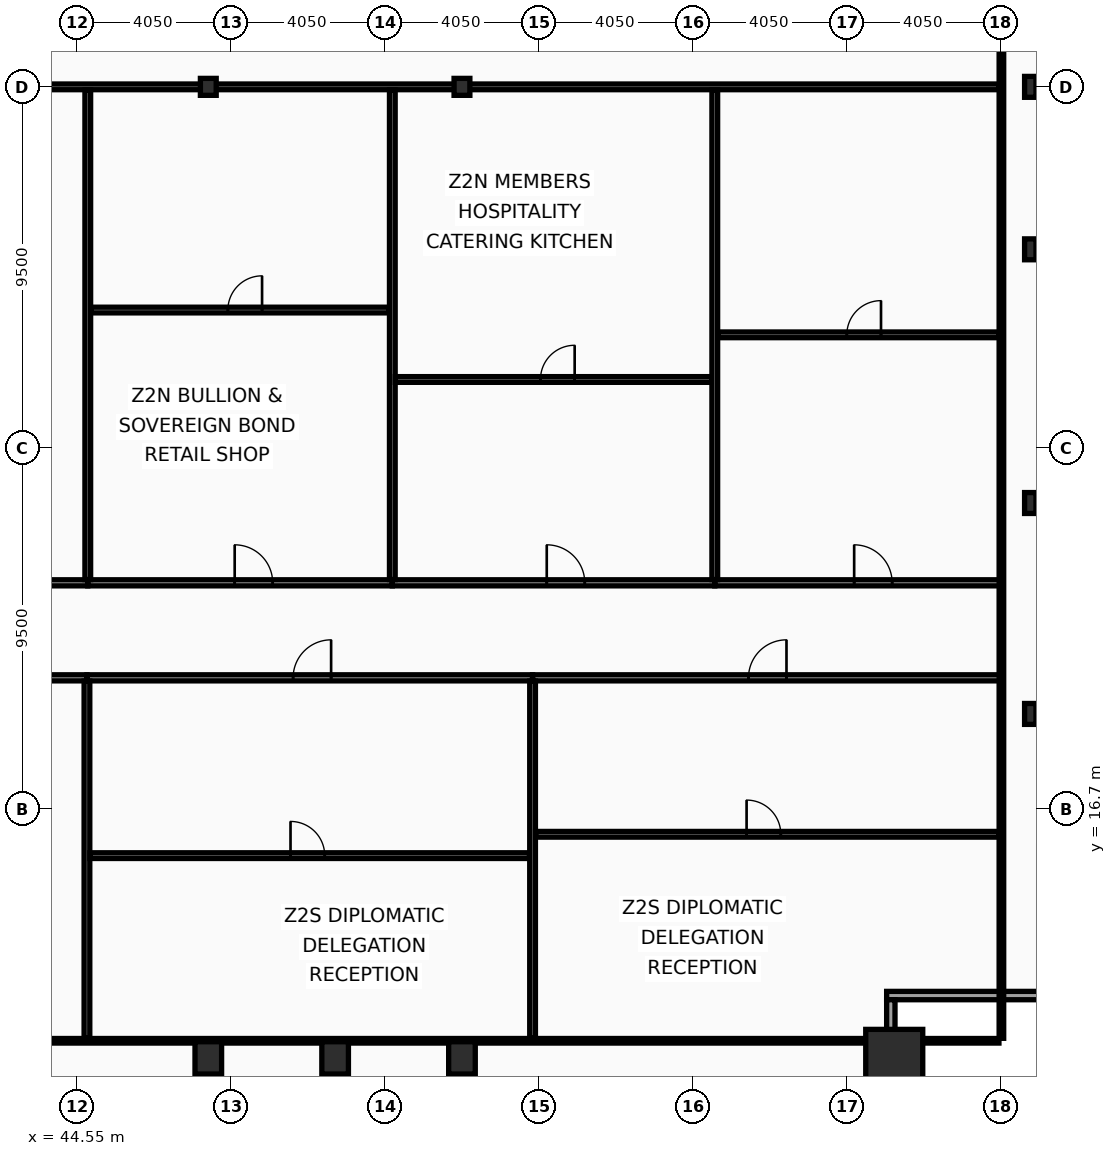
"""IFC4 building model, lengths in metres.
Left out: names, types, materials, properties, quantities, classifications, styles, units other than length and angle.
Written with IfcOpenShell. Run it as: python <this file> out.ifc"""

import sys

from ifc_helpers import new_model, si_unit, direction, frame, frame_2d, origin, origin_2d, place, context, subcontext, project, spatial, rectangle, hollow_rectangle, i_section, extrude, element, fill, save


model = new_model("IFC4")
c1 = context("Model", 3, precision=1e-05, world=origin(), true_north=direction((0.0, 1.0)))
c2 = subcontext(c1, "Body", "Model", "MODEL_VIEW")
j1 = project(units=[si_unit("LENGTHUNIT", "METRE"), si_unit("PLANEANGLEUNIT", "RADIAN")], contexts=[c1])
p1 = place(None, origin())
s1 = spatial("IfcSite", under=j1, at=p1, CompositionType="ELEMENT")
p2 = place(p1, origin())
s2 = spatial("IfcBuilding", under=s1, at=p2, CompositionType="ELEMENT")
p3 = place(p2, frame((0.0, 0.0, 118.2)))
s3 = spatial("IfcBuildingStorey", under=s2, at=p3, CompositionType="ELEMENT", Elevation=118.2)
p4 = place(p3, frame((66.05, 10.15, 0.0), z_axis=(0.0, 0.0, 1.0), x_axis=(1.0, 0.0, 0.0)))
e1 = element("IfcColumn", 1, at=p4, inside=s3, PredefinedType="COLUMN", context=c2, shape_type="SweptSolid", body=[
    extrude(hollow_rectangle(XDim=1.5, YDim=1.5, WallThickness=0.07, at=origin_2d()), origin(), (0.0, 0.0, 1.0), 3.6),
])
for number, where, z_axis, x_axis in (
    (2, (48.0, 10.15, 0.0), (0.0, 0.0, 1.0), (1.0, 0.0, 0.0)),
    (3, (51.337, 10.15, 0.0), (0.0, 0.0, 1.0), (1.0, 0.0, 0.0)),
    (4, (54.675, 10.15, 0.0), (0.0, 0.0, 1.0), (1.0, 0.0, 0.0)),
):
    element("IfcColumn", number, at=place(p3, frame(where, z_axis=z_axis, x_axis=x_axis)), inside=s3, PredefinedType="COLUMN", context=c2, shape_type="SweptSolid", body=[
        extrude(hollow_rectangle(XDim=0.7, YDim=0.85, WallThickness=0.05, at=origin_2d()), origin(), (0.0, 0.0, 1.0), 3.6),
    ])
for number, where, z_axis, x_axis in (
    (5, (69.63, 19.2, 0.0), (0.0, 0.0, 1.0), (1.0, 0.0, 0.0)),
    (6, (69.63, 24.75, 0.0), (0.0, 0.0, 1.0), (1.0, 0.0, 0.0)),
    (7, (69.63, 31.425, 0.0), (0.0, 0.0, 1.0), (1.0, 0.0, 0.0)),
    (8, (69.63, 35.7, 0.0), (0.0, 0.0, 1.0), (1.0, 0.0, 0.0)),
):
    element("IfcColumn", number, at=place(p3, frame(where, z_axis=z_axis, x_axis=x_axis)), inside=s3, PredefinedType="COLUMN", context=c2, shape_type="SweptSolid", body=[
        extrude(i_section(OverallWidth=0.3, OverallDepth=0.55, WebThickness=0.015, FlangeThickness=0.029, at=origin_2d()), origin(), (0.0, 0.0, 1.0), 3.6),
    ])
for number, where, z_axis, x_axis in (
    (9, (48.0, 35.7, 0.0), (0.0, 0.0, 1.0), (1.0, 0.0, 0.0)),
    (10, (54.675, 35.7, 0.0), (0.0, 0.0, 1.0), (1.0, 0.0, 0.0)),
):
    element("IfcColumn", number, at=place(p3, frame(where, z_axis=z_axis, x_axis=x_axis)), inside=s3, PredefinedType="COLUMN", context=c2, shape_type="SweptSolid", body=[
        extrude(i_section(OverallWidth=0.416, OverallDepth=0.446, WebThickness=0.039, FlangeThickness=0.063, at=origin_2d()), origin(), (0.0, 0.0, 1.0), 3.6),
    ])
p5 = place(p3, frame((70.07, 11.79, 0.0), z_axis=(0.0, 0.0, 1.0), x_axis=(-1.0, 0.0, 0.0)))
e11 = element("IfcWall", 11, at=p5, inside=s3, PredefinedType="SOLIDWALL", context=c2, shape_type="SweptSolid", body=[
    extrude(rectangle(XDim=4.22, YDim=0.22, at=frame_2d((2.11, 0.0))), origin(), (0.0, 0.0, 1.0), 2.83),
])
p6 = place(p3, frame((65.96, 11.68, 0.0), z_axis=(0.0, 0.0, 1.0), x_axis=(0.0, -1.0, 0.0)))
e12 = element("IfcWall", 12, at=p6, inside=s3, PredefinedType="SOLIDWALL", context=c2, shape_type="SweptSolid", body=[
    extrude(rectangle(XDim=3.91, YDim=0.22, at=frame_2d((1.955, 0.0))), origin(), (0.0, 0.0, 1.0), 2.83),
])
p7 = place(p3, frame((35.924, 20.15, 0.0), z_axis=(0.0, 0.0, 1.0), x_axis=(1.0, 0.0, 0.0)))
e13 = element("IfcWall", 13, at=p7, inside=s3, PredefinedType="PARTITIONING", context=c2, shape_type="SweptSolid", body=[
    extrude(rectangle(XDim=8.883, YDim=0.16, at=frame_2d((4.441, 0.0))), origin(), (0.0, 0.0, 1.0), 2.73),
])
p8 = place(p7, frame((4.231, 0.0, 0.0)))
e14 = element("IfcOpeningElement", 14, at=p8, cuts=e13, PredefinedType="OPENING", context=c2, shape_type="SweptSolid", body=[
    extrude(rectangle(XDim=1.0, YDim=2.05, at=frame_2d((0.5, 1.025))), frame((0.0, 0.09, 0.0), z_axis=(0.0, -1.0, 0.0), x_axis=(1.0, 0.0, 0.0)), (0.0, 0.0, 1.0), 0.18),
])
p9 = place(p3, frame((44.807, 20.15, 0.0), z_axis=(0.0, 0.0, 1.0), x_axis=(1.0, 0.0, 0.0)))
e15 = element("IfcWall", 15, at=p9, inside=s3, PredefinedType="PARTITIONING", context=c2, shape_type="SweptSolid", body=[
    extrude(rectangle(XDim=11.727, YDim=0.16, at=frame_2d((5.863, 0.0))), origin(), (0.0, 0.0, 1.0), 2.73),
])
p10 = place(p9, frame((5.425, 0.0, 0.0)))
e16 = element("IfcOpeningElement", 16, at=p10, cuts=e15, PredefinedType="OPENING", context=c2, shape_type="SweptSolid", body=[
    extrude(rectangle(XDim=1.0, YDim=2.05, at=frame_2d((0.5, 1.025))), frame((0.0, 0.09, 0.0), z_axis=(0.0, -1.0, 0.0), x_axis=(1.0, 0.0, 0.0)), (0.0, 0.0, 1.0), 0.18),
])
p11 = place(p3, frame((44.807, 10.665, 0.0), z_axis=(0.0, 0.0, 1.0), x_axis=(0.0, 1.0, 0.0)))
e17 = element("IfcWall", 17, at=p11, inside=s3, PredefinedType="PARTITIONING", context=c2, shape_type="SweptSolid", body=[
    extrude(rectangle(XDim=9.4, YDim=0.15, at=frame_2d((4.7, 0.0))), origin(), (0.0, 0.0, 1.0), 2.88),
])
p12 = place(p3, frame((44.887, 15.472, 0.0), z_axis=(0.0, 0.0, 1.0), x_axis=(1.0, 0.0, 0.0)))
e18 = element("IfcWall", 18, at=p12, inside=s3, PredefinedType="PARTITIONING", context=c2, shape_type="SweptSolid", body=[
    extrude(rectangle(XDim=11.566, YDim=0.15, at=frame_2d((5.783, 0.0))), origin(), (0.0, 0.0, 1.0), 2.73),
])
p13 = place(p12, frame((5.277, 0.0, 0.0)))
e19 = element("IfcOpeningElement", 19, at=p13, cuts=e18, PredefinedType="OPENING", context=c2, shape_type="SweptSolid", body=[
    extrude(rectangle(XDim=0.9, YDim=2.05, at=frame_2d((0.45, 1.025))), frame((0.0, 0.085, 0.0), z_axis=(0.0, -1.0, 0.0), x_axis=(1.0, 0.0, 0.0)), (0.0, 0.0, 1.0), 0.17),
])
p14 = place(p3, frame((56.533, 20.15, 0.0), z_axis=(0.0, 0.0, 1.0), x_axis=(1.0, 0.0, 0.0)))
e20 = element("IfcWall", 20, at=p14, inside=s3, PredefinedType="PARTITIONING", context=c2, shape_type="SweptSolid", body=[
    extrude(rectangle(XDim=12.337, YDim=0.16, at=frame_2d((6.168, 0.0))), origin(), (0.0, 0.0, 1.0), 3.44),
])
p15 = place(p14, frame((5.681, 0.0, 0.0)))
e21 = element("IfcOpeningElement", 21, at=p15, cuts=e20, PredefinedType="OPENING", context=c2, shape_type="SweptSolid", body=[
    extrude(rectangle(XDim=1.0, YDim=2.05, at=frame_2d((0.5, 1.025))), frame((0.0, 0.09, 0.0), z_axis=(0.0, -1.0, 0.0), x_axis=(1.0, 0.0, 0.0)), (0.0, 0.0, 1.0), 0.18),
])
p16 = place(p3, frame((56.533, 10.665, 0.0), z_axis=(0.0, 0.0, 1.0), x_axis=(0.0, 1.0, 0.0)))
e22 = element("IfcWall", 22, at=p16, inside=s3, PredefinedType="PARTITIONING", context=c2, shape_type="SweptSolid", body=[
    extrude(rectangle(XDim=9.4, YDim=0.15, at=frame_2d((4.7, 0.0))), origin(), (0.0, 0.0, 1.0), 2.73),
])
p17 = place(p3, frame((56.613, 16.034, 0.0), z_axis=(0.0, 0.0, 1.0), x_axis=(1.0, 0.0, 0.0)))
e23 = element("IfcWall", 23, at=p17, inside=s3, PredefinedType="PARTITIONING", context=c2, shape_type="SweptSolid", body=[
    extrude(rectangle(XDim=12.192, YDim=0.15, at=frame_2d((6.096, 0.0))), origin(), (0.0, 0.0, 1.0), 2.83),
])
p18 = place(p17, frame((5.552, 0.0, 0.0)))
e24 = element("IfcOpeningElement", 24, at=p18, cuts=e23, PredefinedType="OPENING", context=c2, shape_type="SweptSolid", body=[
    extrude(rectangle(XDim=0.9, YDim=2.05, at=frame_2d((0.45, 1.025))), frame((0.0, 0.085, 0.0), z_axis=(0.0, -1.0, 0.0), x_axis=(1.0, 0.0, 0.0)), (0.0, 0.0, 1.0), 0.17),
])
p19 = place(p3, frame((21.81, 35.7, 0.0), z_axis=(0.0, 0.0, 1.0), x_axis=(1.0, 0.0, 0.0)))
e25 = element("IfcWall", 25, at=p19, inside=s3, PredefinedType="PARTITIONING", context=c2, shape_type="SweptSolid", body=[
    extrude(rectangle(XDim=46.995, YDim=0.15, at=frame_2d((23.498, 0.0))), origin(), (0.0, 0.0, 1.0), 2.73),
])
p20 = place(p3, frame((36.344, 22.65, 0.0), z_axis=(0.0, 0.0, 1.0), x_axis=(1.0, 0.0, 0.0)))
e26 = element("IfcWall", 26, at=p20, inside=s3, PredefinedType="PARTITIONING", context=c2, shape_type="SweptSolid", body=[
    extrude(rectangle(XDim=8.485, YDim=0.16, at=frame_2d((4.243, 0.0))), origin(), (0.0, 0.0, 1.0), 2.73),
])
p21 = place(p20, frame((4.064, 0.0, 0.0)))
e27 = element("IfcOpeningElement", 27, at=p21, cuts=e26, PredefinedType="OPENING", context=c2, shape_type="SweptSolid", body=[
    extrude(rectangle(XDim=1.0, YDim=2.05, at=frame_2d((0.5, 1.025))), frame((0.0, 0.09, 0.0), z_axis=(0.0, -1.0, 0.0), x_axis=(1.0, 0.0, 0.0)), (0.0, 0.0, 1.0), 0.18),
])
p22 = place(p3, frame((44.829, 22.65, 0.0), z_axis=(0.0, 0.0, 1.0), x_axis=(1.0, 0.0, 0.0)))
e28 = element("IfcWall", 28, at=p22, inside=s3, PredefinedType="PARTITIONING", context=c2, shape_type="SweptSolid", body=[
    extrude(rectangle(XDim=8.014, YDim=0.16, at=frame_2d((4.007, 0.0))), origin(), (0.0, 0.0, 1.0), 2.73),
])
p23 = place(p22, frame((3.866, 0.0, 0.0)))
e29 = element("IfcOpeningElement", 29, at=p23, cuts=e28, PredefinedType="OPENING", context=c2, shape_type="SweptSolid", body=[
    extrude(rectangle(XDim=1.0, YDim=2.05, at=frame_2d((0.5, 1.025))), frame((0.0, 0.09, 0.0), z_axis=(0.0, -1.0, 0.0), x_axis=(1.0, 0.0, 0.0)), (0.0, 0.0, 1.0), 0.18),
])
p24 = place(p3, frame((44.829, 22.735, 0.0), z_axis=(0.0, 0.0, 1.0), x_axis=(0.0, 1.0, 0.0)))
e30 = element("IfcWall", 30, at=p24, inside=s3, PredefinedType="PARTITIONING", context=c2, shape_type="SweptSolid", body=[
    extrude(rectangle(XDim=12.885, YDim=0.15, at=frame_2d((6.442, 0.0))), origin(), (0.0, 0.0, 1.0), 2.88),
])
p25 = place(p3, frame((44.909, 29.827, 0.0), z_axis=(0.0, 0.0, 1.0), x_axis=(1.0, 0.0, 0.0)))
e31 = element("IfcWall", 31, at=p25, inside=s3, PredefinedType="PARTITIONING", context=c2, shape_type="SweptSolid", body=[
    extrude(rectangle(XDim=7.854, YDim=0.15, at=frame_2d((3.927, 0.0))), origin(), (0.0, 0.0, 1.0), 2.73),
])
p26 = place(p25, frame((3.606, 0.0, 0.0)))
e32 = element("IfcOpeningElement", 32, at=p26, cuts=e31, PredefinedType="OPENING", context=c2, shape_type="SweptSolid", body=[
    extrude(rectangle(XDim=0.9, YDim=2.05, at=frame_2d((0.45, 1.025))), frame((0.0, 0.085, 0.0), z_axis=(0.0, -1.0, 0.0), x_axis=(1.0, 0.0, 0.0)), (0.0, 0.0, 1.0), 0.17),
])
p27 = place(p3, frame((52.842, 22.65, 0.0), z_axis=(0.0, 0.0, 1.0), x_axis=(1.0, 0.0, 0.0)))
e33 = element("IfcWall", 33, at=p27, inside=s3, PredefinedType="PARTITIONING", context=c2, shape_type="SweptSolid", body=[
    extrude(rectangle(XDim=8.485, YDim=0.16, at=frame_2d((4.243, 0.0))), origin(), (0.0, 0.0, 1.0), 2.73),
])
p28 = place(p27, frame((4.064, 0.0, 0.0)))
e34 = element("IfcOpeningElement", 34, at=p28, cuts=e33, PredefinedType="OPENING", context=c2, shape_type="SweptSolid", body=[
    extrude(rectangle(XDim=1.0, YDim=2.05, at=frame_2d((0.5, 1.025))), frame((0.0, 0.09, 0.0), z_axis=(0.0, -1.0, 0.0), x_axis=(1.0, 0.0, 0.0)), (0.0, 0.0, 1.0), 0.18),
])
p29 = place(p3, frame((52.842, 22.735, 0.0), z_axis=(0.0, 0.0, 1.0), x_axis=(0.0, 1.0, 0.0)))
e35 = element("IfcWall", 35, at=p29, inside=s3, PredefinedType="PARTITIONING", context=c2, shape_type="SweptSolid", body=[
    extrude(rectangle(XDim=12.885, YDim=0.15, at=frame_2d((6.442, 0.0))), origin(), (0.0, 0.0, 1.0), 2.88),
])
p30 = place(p3, frame((52.922, 28.0, 0.0), z_axis=(0.0, 0.0, 1.0), x_axis=(1.0, 0.0, 0.0)))
e36 = element("IfcWall", 36, at=p30, inside=s3, PredefinedType="PARTITIONING", context=c2, shape_type="SweptSolid", body=[
    extrude(rectangle(XDim=8.325, YDim=0.15, at=frame_2d((4.163, 0.0))), origin(), (0.0, 0.0, 1.0), 2.73),
])
p31 = place(p30, frame((3.818, 0.0, 0.0)))
e37 = element("IfcOpeningElement", 37, at=p31, cuts=e36, PredefinedType="OPENING", context=c2, shape_type="SweptSolid", body=[
    extrude(rectangle(XDim=0.9, YDim=2.05, at=frame_2d((0.45, 1.025))), frame((0.0, 0.085, 0.0), z_axis=(0.0, -1.0, 0.0), x_axis=(1.0, 0.0, 0.0)), (0.0, 0.0, 1.0), 0.17),
])
p32 = place(p3, frame((61.328, 22.65, 0.0), z_axis=(0.0, 0.0, 1.0), x_axis=(1.0, 0.0, 0.0)))
e38 = element("IfcWall", 38, at=p32, inside=s3, PredefinedType="PARTITIONING", context=c2, shape_type="SweptSolid", body=[
    extrude(rectangle(XDim=7.542, YDim=0.16, at=frame_2d((3.771, 0.0))), origin(), (0.0, 0.0, 1.0), 3.44),
])
p33 = place(p32, frame((3.668, 0.0, 0.0)))
e39 = element("IfcOpeningElement", 39, at=p33, cuts=e38, PredefinedType="OPENING", context=c2, shape_type="SweptSolid", body=[
    extrude(rectangle(XDim=1.0, YDim=2.05, at=frame_2d((0.5, 1.025))), frame((0.0, 0.09, 0.0), z_axis=(0.0, -1.0, 0.0), x_axis=(1.0, 0.0, 0.0)), (0.0, 0.0, 1.0), 0.18),
])
p34 = place(p3, frame((61.328, 22.735, 0.0), z_axis=(0.0, 0.0, 1.0), x_axis=(0.0, 1.0, 0.0)))
e40 = element("IfcWall", 40, at=p34, inside=s3, PredefinedType="PARTITIONING", context=c2, shape_type="SweptSolid", body=[
    extrude(rectangle(XDim=12.885, YDim=0.15, at=frame_2d((6.442, 0.0))), origin(), (0.0, 0.0, 1.0), 2.73),
])
p35 = place(p3, frame((61.408, 29.175, 0.0), z_axis=(0.0, 0.0, 1.0), x_axis=(1.0, 0.0, 0.0)))
e41 = element("IfcWall", 41, at=p35, inside=s3, PredefinedType="PARTITIONING", context=c2, shape_type="SweptSolid", body=[
    extrude(rectangle(XDim=7.397, YDim=0.15, at=frame_2d((3.699, 0.0))), origin(), (0.0, 0.0, 1.0), 3.44),
])
p36 = place(p35, frame((3.394, 0.0, 0.0)))
e42 = element("IfcOpeningElement", 42, at=p36, cuts=e41, PredefinedType="OPENING", context=c2, shape_type="SweptSolid", body=[
    extrude(rectangle(XDim=0.9, YDim=2.05, at=frame_2d((0.45, 1.025))), frame((0.0, 0.085, 0.0), z_axis=(0.0, -1.0, 0.0), x_axis=(1.0, 0.0, 0.0)), (0.0, 0.0, 1.0), 0.17),
])
p37 = place(p3, frame((68.87, 10.665, 0.0), z_axis=(0.0, 0.0, 1.0), x_axis=(0.0, 1.0, 0.0)))
e43 = element("IfcWall", 43, at=p37, inside=s3, PredefinedType="PARTITIONING", context=c2, shape_type="SweptSolid", body=[
    extrude(rectangle(XDim=42.11, YDim=0.12, at=frame_2d((21.055, 0.0))), origin(), (0.0, 0.0, 1.0), 2.73),
])
p38 = place(p3, frame((4.095, 10.6, 0.0), z_axis=(0.0, 0.0, 1.0), x_axis=(1.0, 0.0, 0.0)))
e44 = element("IfcWall", 44, at=p38, inside=s3, PredefinedType="PARTITIONING", context=c2, shape_type="SweptSolid", body=[
    extrude(rectangle(XDim=64.71, YDim=0.12, at=frame_2d((32.355, 0.0))), origin(), (0.0, 0.0, 1.0), 2.73),
])
p39 = place(p10, origin())
e45 = element("IfcDoor", 45, at=p39, inside=s3, OperationType="SINGLE_SWING_RIGHT", PredefinedType="DOOR", context=c2, shape_type="SweptSolid", body=[
    extrude(rectangle(XDim=1.0, YDim=2.05, at=frame_2d((0.5, 1.025))), frame((0.0, 0.025, 0.0), z_axis=(0.0, -1.0, 0.0), x_axis=(1.0, 0.0, 0.0)), (0.0, 0.0, 1.0), 0.05),
])
fill(e16, e45)
p40 = place(p13, origin())
e46 = element("IfcDoor", 46, at=p40, inside=s3, OperationType="SINGLE_SWING_LEFT", PredefinedType="DOOR", context=c2, shape_type="SweptSolid", body=[
    extrude(rectangle(XDim=0.9, YDim=2.05, at=frame_2d((0.45, 1.025))), frame((0.0, 0.025, 0.0), z_axis=(0.0, -1.0, 0.0), x_axis=(1.0, 0.0, 0.0)), (0.0, 0.0, 1.0), 0.05),
])
fill(e19, e46)
p41 = place(p15, origin())
e47 = element("IfcDoor", 47, at=p41, inside=s3, OperationType="SINGLE_SWING_RIGHT", PredefinedType="DOOR", context=c2, shape_type="SweptSolid", body=[
    extrude(rectangle(XDim=1.0, YDim=2.05, at=frame_2d((0.5, 1.025))), frame((0.0, 0.025, 0.0), z_axis=(0.0, -1.0, 0.0), x_axis=(1.0, 0.0, 0.0)), (0.0, 0.0, 1.0), 0.05),
])
fill(e21, e47)
p42 = place(p18, origin())
e48 = element("IfcDoor", 48, at=p42, inside=s3, OperationType="SINGLE_SWING_LEFT", PredefinedType="DOOR", context=c2, shape_type="SweptSolid", body=[
    extrude(rectangle(XDim=0.9, YDim=2.05, at=frame_2d((0.45, 1.025))), frame((0.0, 0.025, 0.0), z_axis=(0.0, -1.0, 0.0), x_axis=(1.0, 0.0, 0.0)), (0.0, 0.0, 1.0), 0.05),
])
fill(e24, e48)
p43 = place(p23, origin())
e49 = element("IfcDoor", 49, at=p43, inside=s3, OperationType="SINGLE_SWING_LEFT", PredefinedType="DOOR", context=c2, shape_type="SweptSolid", body=[
    extrude(rectangle(XDim=1.0, YDim=2.05, at=frame_2d((0.5, 1.025))), frame((0.0, 0.025, 0.0), z_axis=(0.0, -1.0, 0.0), x_axis=(1.0, 0.0, 0.0)), (0.0, 0.0, 1.0), 0.05),
])
fill(e29, e49)
p44 = place(p26, origin())
e50 = element("IfcDoor", 50, at=p44, inside=s3, OperationType="SINGLE_SWING_RIGHT", PredefinedType="DOOR", context=c2, shape_type="SweptSolid", body=[
    extrude(rectangle(XDim=0.9, YDim=2.05, at=frame_2d((0.45, 1.025))), frame((0.0, 0.025, 0.0), z_axis=(0.0, -1.0, 0.0), x_axis=(1.0, 0.0, 0.0)), (0.0, 0.0, 1.0), 0.05),
])
fill(e32, e50)
p45 = place(p28, origin())
e51 = element("IfcDoor", 51, at=p45, inside=s3, OperationType="SINGLE_SWING_LEFT", PredefinedType="DOOR", context=c2, shape_type="SweptSolid", body=[
    extrude(rectangle(XDim=1.0, YDim=2.05, at=frame_2d((0.5, 1.025))), frame((0.0, 0.025, 0.0), z_axis=(0.0, -1.0, 0.0), x_axis=(1.0, 0.0, 0.0)), (0.0, 0.0, 1.0), 0.05),
])
fill(e34, e51)
p46 = place(p31, origin())
e52 = element("IfcDoor", 52, at=p46, inside=s3, OperationType="SINGLE_SWING_RIGHT", PredefinedType="DOOR", context=c2, shape_type="SweptSolid", body=[
    extrude(rectangle(XDim=0.9, YDim=2.05, at=frame_2d((0.45, 1.025))), frame((0.0, 0.025, 0.0), z_axis=(0.0, -1.0, 0.0), x_axis=(1.0, 0.0, 0.0)), (0.0, 0.0, 1.0), 0.05),
])
fill(e37, e52)
p47 = place(p33, origin())
e53 = element("IfcDoor", 53, at=p47, inside=s3, OperationType="SINGLE_SWING_LEFT", PredefinedType="DOOR", context=c2, shape_type="SweptSolid", body=[
    extrude(rectangle(XDim=1.0, YDim=2.05, at=frame_2d((0.5, 1.025))), frame((0.0, 0.025, 0.0), z_axis=(0.0, -1.0, 0.0), x_axis=(1.0, 0.0, 0.0)), (0.0, 0.0, 1.0), 0.05),
])
fill(e39, e53)
p48 = place(p36, origin())
e54 = element("IfcDoor", 54, at=p48, inside=s3, OperationType="SINGLE_SWING_RIGHT", PredefinedType="DOOR", context=c2, shape_type="SweptSolid", body=[
    extrude(rectangle(XDim=0.9, YDim=2.05, at=frame_2d((0.45, 1.025))), frame((0.0, 0.025, 0.0), z_axis=(0.0, -1.0, 0.0), x_axis=(1.0, 0.0, 0.0)), (0.0, 0.0, 1.0), 0.05),
])
fill(e42, e54)
save(model, sys.argv[1])
